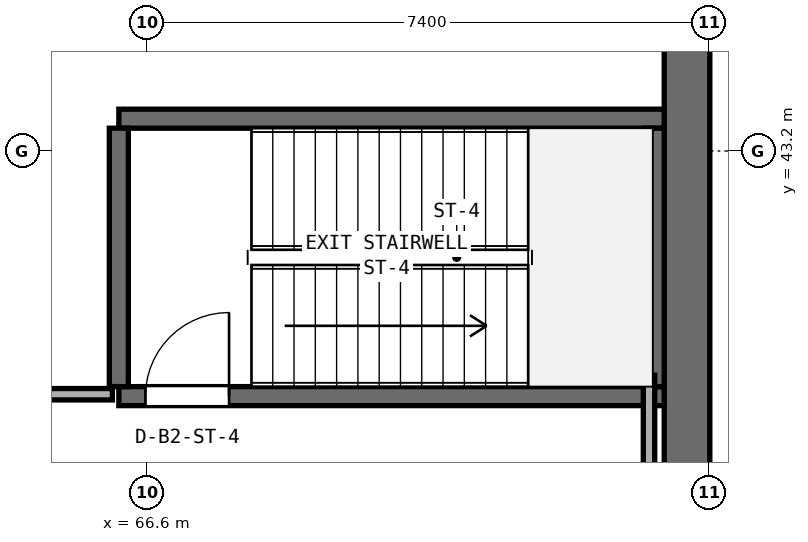
"""IFC4 building model, lengths in metres.
Left out: names, types, materials, properties, quantities, classifications, styles, units other than length and angle.
Written with IfcOpenShell. Run it as: python <this file> out.ifc"""

import sys

from ifc_helpers import new_model, si_unit, direction, frame, frame_2d, origin, place, context, subcontext, project, spatial, rectangle, extrude, element, fill, save


model = new_model("IFC4")
c1 = context("Model", 3, precision=1e-05, world=origin(), true_north=direction((0.0, 1.0)))
c2 = subcontext(c1, "Body", "Model", "MODEL_VIEW")
j1 = project(units=[si_unit("LENGTHUNIT", "METRE"), si_unit("PLANEANGLEUNIT", "RADIAN")], contexts=[c1])
p1 = place(None, origin())
s1 = spatial("IfcSite", under=j1, at=p1, CompositionType="ELEMENT")
p2 = place(p1, origin())
s2 = spatial("IfcBuilding", under=s1, at=p2, CompositionType="ELEMENT")
p3 = place(p2, frame((0.0, 0.0, -9.6)))
s3 = spatial("IfcBuildingStorey", under=s2, at=p3, CompositionType="ELEMENT", Elevation=-9.6)
p4 = place(p3, frame((73.7, 0.6, 0.0), z_axis=(0.0, 0.0, 1.0), x_axis=(0.0, 1.0, 0.0)))
e1 = element("IfcWall", 1, at=p4, inside=s3, PredefinedType="SOLIDWALL", context=c2, shape_type="SweptSolid", body=[
    extrude(rectangle(XDim=49.2, YDim=0.6, at=frame_2d((24.6, 0.0))), origin(), (0.0, 0.0, 1.0), 4.45),
])
p5 = place(p3, frame((66.225, 39.975, 0.0), z_axis=(0.0, 0.0, 1.0), x_axis=(1.0, 0.0, 0.0)))
e2 = element("IfcWall", 2, at=p5, inside=s3, PredefinedType="SHEAR", context=c2, shape_type="SweptSolid", body=[
    extrude(rectangle(XDim=7.175, YDim=0.25, at=frame_2d((3.587, 0.0))), origin(), (0.0, 0.0, 1.0), 4.45),
])
p6 = place(p5, frame((0.35, 0.0, 0.0)))
e3 = element("IfcOpeningElement", 3, at=p6, cuts=e2, PredefinedType="OPENING", context=c2, shape_type="SweptSolid", body=[
    extrude(rectangle(XDim=1.1, YDim=2.15, at=frame_2d((0.55, 1.075))), frame((0.0, 0.135, 0.0), z_axis=(0.0, -1.0, 0.0), x_axis=(1.0, 0.0, 0.0)), (0.0, 0.0, 1.0), 0.27),
])
p7 = place(p3, frame((66.225, 43.625, 0.0), z_axis=(0.0, 0.0, 1.0), x_axis=(1.0, 0.0, 0.0)))
e4 = element("IfcWall", 4, at=p7, inside=s3, PredefinedType="SHEAR", context=c2, shape_type="SweptSolid", body=[
    extrude(rectangle(XDim=7.175, YDim=0.25, at=frame_2d((3.587, 0.0))), origin(), (0.0, 0.0, 1.0), 4.45),
])
for number, where, z_axis, x_axis in (
    (5, (66.225, 40.1, 0.0), (0.0, 0.0, 1.0), (0.0, 1.0, 0.0)),
    (6, (73.275, 40.1, 0.0), (0.0, 0.0, 1.0), (0.0, 1.0, 0.0)),
):
    element("IfcWall", number, at=place(p3, frame(where, z_axis=z_axis, x_axis=x_axis)), inside=s3, PredefinedType="SHEAR", context=c2, shape_type="SweptSolid", body=[
        extrude(rectangle(XDim=3.4, YDim=0.25, at=frame_2d((1.7, 0.0))), origin(), (0.0, 0.0, 1.0), 4.45),
    ])
p8 = place(p3, frame((73.2, 37.14, 0.0), z_axis=(0.0, 0.0, 1.0), x_axis=(0.0, 1.0, 0.0)))
e7 = element("IfcWall", 7, at=p8, inside=s3, PredefinedType="PARTITIONING", context=c2, shape_type="SweptSolid", body=[
    extrude(rectangle(XDim=3.11, YDim=0.15, at=frame_2d((1.555, 0.0))), origin(), (0.0, 0.0, 1.0), 4.45),
])
p9 = place(p3, frame((8.46, 40.0, 0.0), z_axis=(0.0, 0.0, 1.0), x_axis=(1.0, 0.0, 0.0)))
e8 = element("IfcWall", 8, at=p9, inside=s3, PredefinedType="PARTITIONING", context=c2, shape_type="SweptSolid", body=[
    extrude(rectangle(XDim=57.68, YDim=0.15, at=frame_2d((28.84, 0.0))), origin(), (0.0, 0.0, 1.0), 4.45),
])
p10 = place(p9, frame((28.09, 0.0, 0.0)))
e9 = element("IfcOpeningElement", 9, at=p10, cuts=e8, PredefinedType="OPENING", context=c2, shape_type="SweptSolid", body=[
    extrude(rectangle(XDim=1.5, YDim=2.15, at=frame_2d((0.75, 1.075))), frame((0.0, 0.085, 0.0), z_axis=(0.0, -1.0, 0.0), x_axis=(1.0, 0.0, 0.0)), (0.0, 0.0, 1.0), 0.17),
])
p11 = place(p6, origin())
e10 = element("IfcDoor", 10, at=p11, inside=s3, OperationType="SINGLE_SWING_RIGHT", PredefinedType="DOOR", context=c2, shape_type="SweptSolid", body=[
    extrude(rectangle(XDim=1.1, YDim=2.15, at=frame_2d((0.55, 1.075))), frame((0.0, 0.025, 0.0), z_axis=(0.0, -1.0, 0.0), x_axis=(1.0, 0.0, 0.0)), (0.0, 0.0, 1.0), 0.05),
])
fill(e3, e10)
save(model, sys.argv[1])
